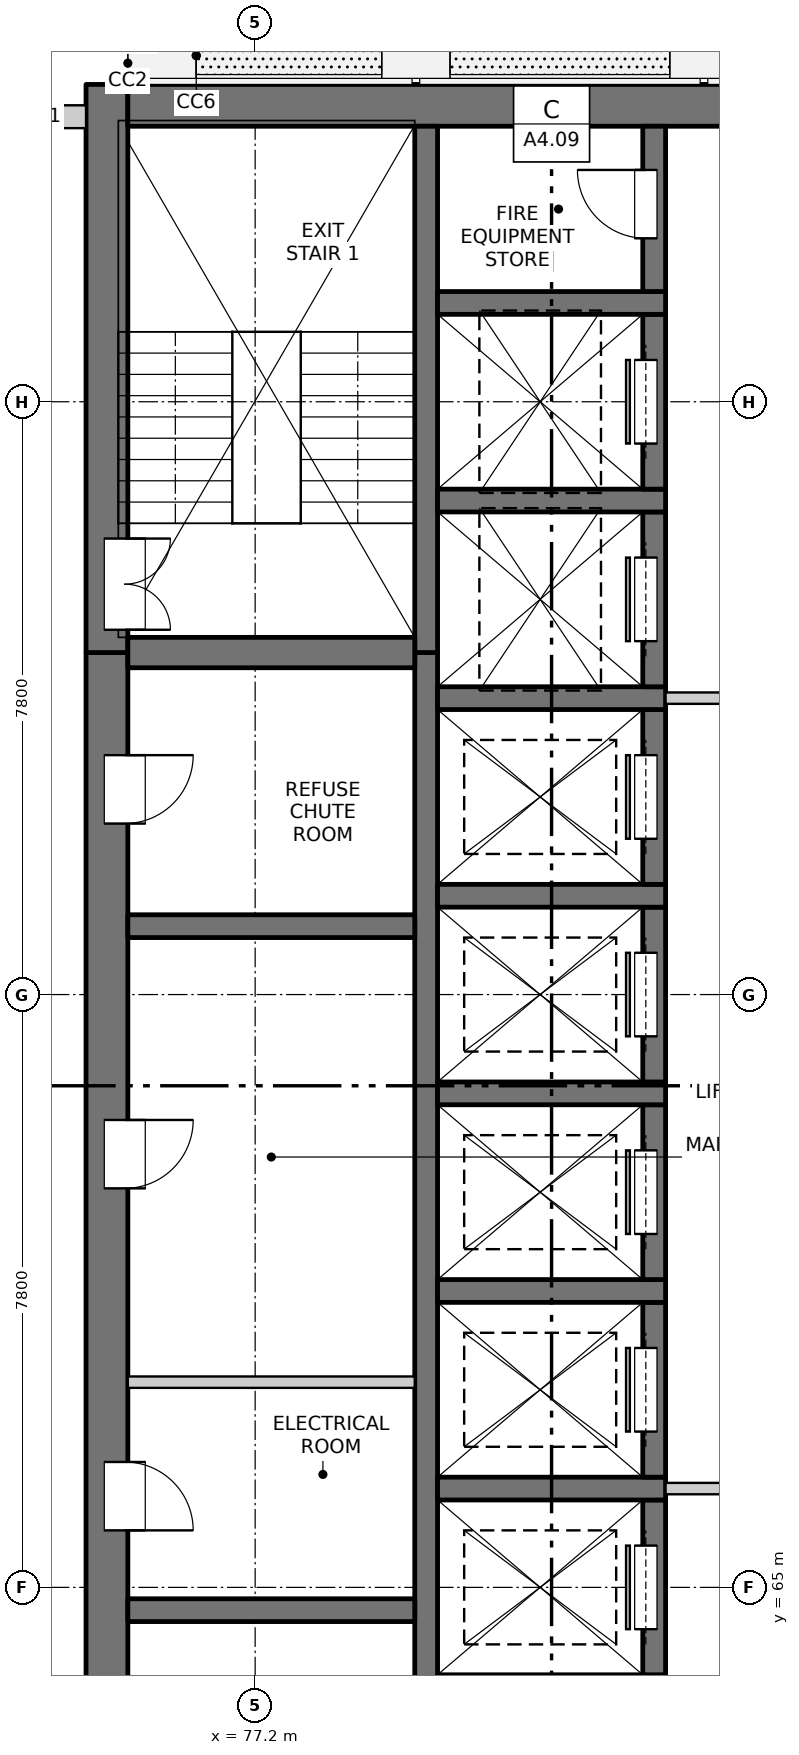
"""IFC4 building model, lengths in metres.
Left out: names, types, materials, properties, quantities, classifications, styles, units other than length and angle.
Written with IfcOpenShell. Run it as: python <this file> out.ifc"""

import sys

from ifc_helpers import new_model, si_unit, direction, frame, frame_2d, origin, place, context, subcontext, project, spatial, rectangle, extrude, element, fill, save


model = new_model("IFC4")
c1 = context("Model", 3, precision=1e-05, world=origin(), true_north=direction((0.0, 1.0)))
c2 = subcontext(c1, "Body", "Model", "MODEL_VIEW")
j1 = project(units=[si_unit("LENGTHUNIT", "METRE"), si_unit("PLANEANGLEUNIT", "RADIAN")], contexts=[c1])
p1 = place(None, origin())
s1 = spatial("IfcSite", under=j1, at=p1, CompositionType="ELEMENT")
p2 = place(p1, origin())
s2 = spatial("IfcBuilding", under=s1, at=p2, CompositionType="ELEMENT")
p3 = place(p2, frame((0.0, 0.0, 110.1)))
s3 = spatial("IfcBuildingStorey", under=s2, at=p3, CompositionType="ELEMENT", Elevation=110.1)
p4 = place(p3, frame((75.25, 54.975, -0.25), z_axis=(0.0, 0.0, 1.0), x_axis=(0.0, 1.0, 0.0)))
e1 = element("IfcWall", 1, at=p4, inside=s3, PredefinedType="SOLIDWALL", context=c2, shape_type="SweptSolid", body=[
    extrude(rectangle(XDim=22.325, YDim=0.55, at=frame_2d((11.163, 0.0))), origin(), (0.0, 0.0, 1.0), 3.4),
])
p5 = place(p4, frame((7.475, 0.0, 0.25)))
e2 = element("IfcOpeningElement", 2, at=p5, cuts=e1, PredefinedType="OPENING", context=c2, shape_type="SweptSolid", body=[
    extrude(rectangle(XDim=0.9, YDim=2.1, at=frame_2d((0.45, 1.05))), frame((0.0, 0.285, 0.0), z_axis=(0.0, -1.0, 0.0), x_axis=(1.0, 0.0, 0.0)), (0.0, 0.0, 1.0), 0.57),
])
p6 = place(p4, frame((10.775, 0.0, 0.25)))
e3 = element("IfcOpeningElement", 3, at=p6, cuts=e1, PredefinedType="OPENING", context=c2, shape_type="SweptSolid", body=[
    extrude(rectangle(XDim=0.9, YDim=2.1, at=frame_2d((0.45, 1.05))), frame((0.0, 0.285, 0.0), z_axis=(0.0, -1.0, 0.0), x_axis=(1.0, 0.0, 0.0)), (0.0, 0.0, 1.0), 0.57),
])
p7 = place(p4, frame((15.275, 0.0, 0.25)))
e4 = element("IfcOpeningElement", 4, at=p7, cuts=e1, PredefinedType="OPENING", context=c2, shape_type="SweptSolid", body=[
    extrude(rectangle(XDim=0.9, YDim=2.1, at=frame_2d((0.45, 1.05))), frame((0.0, 0.285, 0.0), z_axis=(0.0, -1.0, 0.0), x_axis=(1.0, 0.0, 0.0)), (0.0, 0.0, 1.0), 0.57),
])
p8 = place(p4, frame((20.075, 0.0, 0.25)))
e5 = element("IfcOpeningElement", 5, at=p8, cuts=e1, PredefinedType="OPENING", context=c2, shape_type="SweptSolid", body=[
    extrude(rectangle(XDim=0.9, YDim=2.1, at=frame_2d((0.45, 1.05))), frame((0.0, 0.285, 0.0), z_axis=(0.0, -1.0, 0.0), x_axis=(1.0, 0.0, 0.0)), (0.0, 0.0, 1.0), 0.57),
])
p9 = place(p3, frame((75.25, 77.3, -0.25), z_axis=(0.0, 0.0, 1.0), x_axis=(0.0, 1.0, 0.0)))
e6 = element("IfcWall", 6, at=p9, inside=s3, PredefinedType="SOLIDWALL", context=c2, shape_type="SweptSolid", body=[
    extrude(rectangle(XDim=7.475, YDim=0.55, at=frame_2d((3.737, 0.0))), origin(), (0.0, 0.0, 1.0), 3.4),
])
p10 = place(p9, frame((0.3, 0.0, 0.25)))
e7 = element("IfcOpeningElement", 7, at=p10, cuts=e6, PredefinedType="OPENING", context=c2, shape_type="SweptSolid", body=[
    extrude(rectangle(XDim=1.2, YDim=2.1, at=frame_2d((0.6, 1.05))), frame((0.0, 0.285, 0.0), z_axis=(0.0, -1.0, 0.0), x_axis=(1.0, 0.0, 0.0)), (0.0, 0.0, 1.0), 0.57),
])
p11 = place(p3, frame((75.525, 84.5, -0.25), z_axis=(0.0, 0.0, 1.0), x_axis=(1.0, 0.0, 0.0)))
e8 = element("IfcWall", 8, at=p11, inside=s3, PredefinedType="SOLIDWALL", context=c2, shape_type="SweptSolid", body=[
    extrude(rectangle(XDim=18.95, YDim=0.55, at=frame_2d((9.475, 0.0))), origin(), (0.0, 0.0, 1.0), 3.4),
])
p12 = place(p3, frame((79.45, 60.95, -0.25), z_axis=(0.0, 0.0, 1.0), x_axis=(0.0, 1.0, 0.0)))
e9 = element("IfcWall", 9, at=p12, inside=s3, PredefinedType="SOLIDWALL", context=c2, shape_type="SweptSolid", body=[
    extrude(rectangle(XDim=16.35, YDim=0.3, at=frame_2d((8.175, 0.0))), origin(), (0.0, 0.0, 1.0), 3.4),
])
p13 = place(p3, frame((79.45, 77.3, -0.25), z_axis=(0.0, 0.0, 1.0), x_axis=(0.0, 1.0, 0.0)))
e10 = element("IfcWall", 10, at=p13, inside=s3, PredefinedType="SOLIDWALL", context=c2, shape_type="SweptSolid", body=[
    extrude(rectangle(XDim=6.925, YDim=0.3, at=frame_2d((3.462, 0.0))), origin(), (0.0, 0.0, 1.0), 3.4),
])
p14 = place(p3, frame((82.45, 63.85, -0.25), z_axis=(0.0, 0.0, 1.0), x_axis=(0.0, 1.0, 0.0)))
e11 = element("IfcWall", 11, at=p14, inside=s3, PredefinedType="SOLIDWALL", context=c2, shape_type="SweptSolid", body=[
    extrude(rectangle(XDim=2.3, YDim=0.3, at=frame_2d((1.15, 0.0))), origin(), (0.0, 0.0, 1.0), 3.4),
])
p15 = place(p14, frame((0.6, 0.0, 0.25)))
e12 = element("IfcOpeningElement", 12, at=p15, cuts=e11, PredefinedType="OPENING", context=c2, shape_type="SweptSolid", body=[
    extrude(rectangle(XDim=1.1, YDim=2.1, at=frame_2d((0.55, 1.05))), frame((0.0, 0.16, 0.0), z_axis=(0.0, -1.0, 0.0), x_axis=(1.0, 0.0, 0.0)), (0.0, 0.0, 1.0), 0.32),
])
p16 = place(p3, frame((79.6, 66.3, -0.25), z_axis=(0.0, 0.0, 1.0), x_axis=(1.0, 0.0, 0.0)))
e13 = element("IfcWall", 13, at=p16, inside=s3, PredefinedType="SOLIDWALL", context=c2, shape_type="SweptSolid", body=[
    extrude(rectangle(XDim=3.0, YDim=0.3, at=frame_2d((1.5, 0.0))), origin(), (0.0, 0.0, 1.0), 3.4),
])
p17 = place(p3, frame((82.45, 66.45, -0.25), z_axis=(0.0, 0.0, 1.0), x_axis=(0.0, 1.0, 0.0)))
e14 = element("IfcWall", 14, at=p17, inside=s3, PredefinedType="SOLIDWALL", context=c2, shape_type="SweptSolid", body=[
    extrude(rectangle(XDim=2.3, YDim=0.3, at=frame_2d((1.15, 0.0))), origin(), (0.0, 0.0, 1.0), 3.4),
])
p18 = place(p17, frame((0.6, 0.0, 0.25)))
e15 = element("IfcOpeningElement", 15, at=p18, cuts=e14, PredefinedType="OPENING", context=c2, shape_type="SweptSolid", body=[
    extrude(rectangle(XDim=1.1, YDim=2.1, at=frame_2d((0.55, 1.05))), frame((0.0, 0.16, 0.0), z_axis=(0.0, -1.0, 0.0), x_axis=(1.0, 0.0, 0.0)), (0.0, 0.0, 1.0), 0.32),
])
p19 = place(p3, frame((79.6, 68.9, -0.25), z_axis=(0.0, 0.0, 1.0), x_axis=(1.0, 0.0, 0.0)))
e16 = element("IfcWall", 16, at=p19, inside=s3, PredefinedType="SOLIDWALL", context=c2, shape_type="SweptSolid", body=[
    extrude(rectangle(XDim=3.0, YDim=0.3, at=frame_2d((1.5, 0.0))), origin(), (0.0, 0.0, 1.0), 3.4),
])
p20 = place(p3, frame((82.45, 69.05, -0.25), z_axis=(0.0, 0.0, 1.0), x_axis=(0.0, 1.0, 0.0)))
e17 = element("IfcWall", 17, at=p20, inside=s3, PredefinedType="SOLIDWALL", context=c2, shape_type="SweptSolid", body=[
    extrude(rectangle(XDim=2.3, YDim=0.3, at=frame_2d((1.15, 0.0))), origin(), (0.0, 0.0, 1.0), 3.4),
])
p21 = place(p20, frame((0.6, 0.0, 0.25)))
e18 = element("IfcOpeningElement", 18, at=p21, cuts=e17, PredefinedType="OPENING", context=c2, shape_type="SweptSolid", body=[
    extrude(rectangle(XDim=1.1, YDim=2.1, at=frame_2d((0.55, 1.05))), frame((0.0, 0.16, 0.0), z_axis=(0.0, -1.0, 0.0), x_axis=(1.0, 0.0, 0.0)), (0.0, 0.0, 1.0), 0.32),
])
p22 = place(p3, frame((79.6, 71.5, -0.25), z_axis=(0.0, 0.0, 1.0), x_axis=(1.0, 0.0, 0.0)))
e19 = element("IfcWall", 19, at=p22, inside=s3, PredefinedType="SOLIDWALL", context=c2, shape_type="SweptSolid", body=[
    extrude(rectangle(XDim=3.0, YDim=0.3, at=frame_2d((1.5, 0.0))), origin(), (0.0, 0.0, 1.0), 3.4),
])
p23 = place(p3, frame((82.45, 71.65, -0.25), z_axis=(0.0, 0.0, 1.0), x_axis=(0.0, 1.0, 0.0)))
e20 = element("IfcWall", 20, at=p23, inside=s3, PredefinedType="SOLIDWALL", context=c2, shape_type="SweptSolid", body=[
    extrude(rectangle(XDim=2.3, YDim=0.3, at=frame_2d((1.15, 0.0))), origin(), (0.0, 0.0, 1.0), 3.4),
])
p24 = place(p23, frame((0.6, 0.0, 0.25)))
e21 = element("IfcOpeningElement", 21, at=p24, cuts=e20, PredefinedType="OPENING", context=c2, shape_type="SweptSolid", body=[
    extrude(rectangle(XDim=1.1, YDim=2.1, at=frame_2d((0.55, 1.05))), frame((0.0, 0.16, 0.0), z_axis=(0.0, -1.0, 0.0), x_axis=(1.0, 0.0, 0.0)), (0.0, 0.0, 1.0), 0.32),
])
p25 = place(p3, frame((79.6, 74.1, -0.25), z_axis=(0.0, 0.0, 1.0), x_axis=(1.0, 0.0, 0.0)))
e22 = element("IfcWall", 22, at=p25, inside=s3, PredefinedType="SOLIDWALL", context=c2, shape_type="SweptSolid", body=[
    extrude(rectangle(XDim=3.0, YDim=0.3, at=frame_2d((1.5, 0.0))), origin(), (0.0, 0.0, 1.0), 3.4),
])
p26 = place(p3, frame((82.45, 74.25, -0.25), z_axis=(0.0, 0.0, 1.0), x_axis=(0.0, 1.0, 0.0)))
e23 = element("IfcWall", 23, at=p26, inside=s3, PredefinedType="SOLIDWALL", context=c2, shape_type="SweptSolid", body=[
    extrude(rectangle(XDim=2.3, YDim=0.3, at=frame_2d((1.15, 0.0))), origin(), (0.0, 0.0, 1.0), 3.4),
])
p27 = place(p26, frame((0.6, 0.0, 0.25)))
e24 = element("IfcOpeningElement", 24, at=p27, cuts=e23, PredefinedType="OPENING", context=c2, shape_type="SweptSolid", body=[
    extrude(rectangle(XDim=1.1, YDim=2.1, at=frame_2d((0.55, 1.05))), frame((0.0, 0.16, 0.0), z_axis=(0.0, -1.0, 0.0), x_axis=(1.0, 0.0, 0.0)), (0.0, 0.0, 1.0), 0.32),
])
p28 = place(p3, frame((79.6, 76.7, -0.25), z_axis=(0.0, 0.0, 1.0), x_axis=(1.0, 0.0, 0.0)))
e25 = element("IfcWall", 25, at=p28, inside=s3, PredefinedType="SOLIDWALL", context=c2, shape_type="SweptSolid", body=[
    extrude(rectangle(XDim=3.0, YDim=0.3, at=frame_2d((1.5, 0.0))), origin(), (0.0, 0.0, 1.0), 3.4),
])
p29 = place(p3, frame((82.45, 76.85, -0.25), z_axis=(0.0, 0.0, 1.0), x_axis=(0.0, 1.0, 0.0)))
e26 = element("IfcWall", 26, at=p29, inside=s3, PredefinedType="SOLIDWALL", context=c2, shape_type="SweptSolid", body=[
    extrude(rectangle(XDim=2.3, YDim=0.3, at=frame_2d((1.15, 0.0))), origin(), (0.0, 0.0, 1.0), 3.4),
])
p30 = place(p29, frame((0.6, 0.0, 0.25)))
e27 = element("IfcOpeningElement", 27, at=p30, cuts=e26, PredefinedType="OPENING", context=c2, shape_type="SweptSolid", body=[
    extrude(rectangle(XDim=1.1, YDim=2.1, at=frame_2d((0.55, 1.05))), frame((0.0, 0.16, 0.0), z_axis=(0.0, -1.0, 0.0), x_axis=(1.0, 0.0, 0.0)), (0.0, 0.0, 1.0), 0.32),
])
p31 = place(p3, frame((79.6, 79.3, -0.25), z_axis=(0.0, 0.0, 1.0), x_axis=(1.0, 0.0, 0.0)))
e28 = element("IfcWall", 28, at=p31, inside=s3, PredefinedType="SOLIDWALL", context=c2, shape_type="SweptSolid", body=[
    extrude(rectangle(XDim=3.0, YDim=0.3, at=frame_2d((1.5, 0.0))), origin(), (0.0, 0.0, 1.0), 3.4),
])
p32 = place(p3, frame((82.45, 79.45, -0.25), z_axis=(0.0, 0.0, 1.0), x_axis=(0.0, 1.0, 0.0)))
e29 = element("IfcWall", 29, at=p32, inside=s3, PredefinedType="SOLIDWALL", context=c2, shape_type="SweptSolid", body=[
    extrude(rectangle(XDim=2.3, YDim=0.3, at=frame_2d((1.15, 0.0))), origin(), (0.0, 0.0, 1.0), 3.4),
])
p33 = place(p32, frame((0.6, 0.0, 0.25)))
e30 = element("IfcOpeningElement", 30, at=p33, cuts=e29, PredefinedType="OPENING", context=c2, shape_type="SweptSolid", body=[
    extrude(rectangle(XDim=1.1, YDim=2.1, at=frame_2d((0.55, 1.05))), frame((0.0, 0.16, 0.0), z_axis=(0.0, -1.0, 0.0), x_axis=(1.0, 0.0, 0.0)), (0.0, 0.0, 1.0), 0.32),
])
p34 = place(p3, frame((79.6, 81.9, -0.25), z_axis=(0.0, 0.0, 1.0), x_axis=(1.0, 0.0, 0.0)))
e31 = element("IfcWall", 31, at=p34, inside=s3, PredefinedType="SOLIDWALL", context=c2, shape_type="SweptSolid", body=[
    extrude(rectangle(XDim=3.0, YDim=0.3, at=frame_2d((1.5, 0.0))), origin(), (0.0, 0.0, 1.0), 3.4),
])
p35 = place(p3, frame((82.45, 82.05, -0.25), z_axis=(0.0, 0.0, 1.0), x_axis=(0.0, 1.0, 0.0)))
e32 = element("IfcWall", 32, at=p35, inside=s3, PredefinedType="SOLIDWALL", context=c2, shape_type="SweptSolid", body=[
    extrude(rectangle(XDim=2.175, YDim=0.3, at=frame_2d((1.087, 0.0))), origin(), (0.0, 0.0, 1.0), 3.4),
])
p36 = place(p35, frame((0.7, 0.0, 0.25)))
e33 = element("IfcOpeningElement", 33, at=p36, cuts=e32, PredefinedType="OPENING", context=c2, shape_type="SweptSolid", body=[
    extrude(rectangle(XDim=0.9, YDim=2.1, at=frame_2d((0.45, 1.05))), frame((0.0, 0.16, 0.0), z_axis=(0.0, -1.0, 0.0), x_axis=(1.0, 0.0, 0.0)), (0.0, 0.0, 1.0), 0.32),
])
for number, where, z_axis, x_axis in (
    (34, (75.525, 64.7, -0.25), (0.0, 0.0, 1.0), (1.0, 0.0, 0.0)),
    (35, (75.525, 73.7, -0.25), (0.0, 0.0, 1.0), (1.0, 0.0, 0.0)),
):
    element("IfcWall", number, at=place(p3, frame(where, z_axis=z_axis, x_axis=x_axis)), inside=s3, PredefinedType="SOLIDWALL", context=c2, shape_type="SweptSolid", body=[
        extrude(rectangle(XDim=3.775, YDim=0.3, at=frame_2d((1.888, 0.0))), origin(), (0.0, 0.0, 1.0), 3.4),
    ])
p37 = place(p3, frame((75.525, 77.3, -0.25), z_axis=(0.0, 0.0, 1.0), x_axis=(1.0, 0.0, 0.0)))
e36 = element("IfcWall", 36, at=p37, inside=s3, PredefinedType="SOLIDWALL", context=c2, shape_type="SweptSolid", body=[
    extrude(rectangle(XDim=3.775, YDim=0.4, at=frame_2d((1.888, 0.0))), origin(), (0.0, 0.0, 1.0), 3.4),
])
p38 = place(p3, frame((73.725, 84.35, 0.0), z_axis=(0.0, 0.0, 1.0), x_axis=(1.0, 0.0, 0.0)))
e37 = element("IfcWall", 37, at=p38, inside=s3, PredefinedType="SOLIDWALL", context=c2, shape_type="SweptSolid", body=[
    extrude(rectangle(XDim=1.25, YDim=0.3, at=frame_2d((0.625, 0.0))), origin(), (0.0, 0.0, 1.0), 2.7),
])
p39 = place(p3, frame((82.6, 66.3, 0.0), z_axis=(0.0, 0.0, 1.0), x_axis=(1.0, 0.0, 0.0)))
e38 = element("IfcWall", 38, at=p39, inside=s3, PredefinedType="PARTITIONING", context=c2, shape_type="SweptSolid", body=[
    extrude(rectangle(XDim=4.8, YDim=0.15, at=frame_2d((2.4, 0.0))), origin(), (0.0, 0.0, 1.0), 3.15),
])
p40 = place(p39, frame((1.5, 0.0, 0.0)))
e39 = element("IfcOpeningElement", 39, at=p40, cuts=e38, PredefinedType="OPENING", context=c2, shape_type="SweptSolid", body=[
    extrude(rectangle(XDim=1.8, YDim=2.1, at=frame_2d((0.9, 1.05))), frame((0.0, 0.085, 0.0), z_axis=(0.0, -1.0, 0.0), x_axis=(1.0, 0.0, 0.0)), (0.0, 0.0, 1.0), 0.17),
])
p41 = place(p3, frame((75.525, 67.7, 0.0), z_axis=(0.0, 0.0, 1.0), x_axis=(1.0, 0.0, 0.0)))
e40 = element("IfcWall", 40, at=p41, inside=s3, PredefinedType="PARTITIONING", context=c2, shape_type="SweptSolid", body=[
    extrude(rectangle(XDim=3.775, YDim=0.15, at=frame_2d((1.887, 0.0))), origin(), (0.0, 0.0, 1.0), 3.15),
])
p42 = place(p3, frame((82.6, 76.7, 0.0), z_axis=(0.0, 0.0, 1.0), x_axis=(1.0, 0.0, 0.0)))
e41 = element("IfcWall", 41, at=p42, inside=s3, PredefinedType="PARTITIONING", context=c2, shape_type="SweptSolid", body=[
    extrude(rectangle(XDim=4.8, YDim=0.15, at=frame_2d((2.4, 0.0))), origin(), (0.0, 0.0, 1.0), 3.15),
])
p43 = place(p42, frame((1.5, 0.0, 0.0)))
e42 = element("IfcOpeningElement", 42, at=p43, cuts=e41, PredefinedType="OPENING", context=c2, shape_type="SweptSolid", body=[
    extrude(rectangle(XDim=1.8, YDim=2.1, at=frame_2d((0.9, 1.05))), frame((0.0, 0.085, 0.0), z_axis=(0.0, -1.0, 0.0), x_axis=(1.0, 0.0, 0.0)), (0.0, 0.0, 1.0), 0.17),
])
p44 = place(p15, origin())
e43 = element("IfcDoor", 43, at=p44, inside=s3, OperationType="SLIDING_TO_RIGHT", PredefinedType="DOOR", context=c2, shape_type="SweptSolid", body=[
    extrude(rectangle(XDim=1.1, YDim=2.1, at=frame_2d((0.55, 1.05))), frame((0.0, 0.135, 0.0), z_axis=(0.0, -1.0, 0.0), x_axis=(1.0, 0.0, 0.0)), (0.0, 0.0, 1.0), 0.05),
])
fill(e12, e43)
p45 = place(p6, origin())
e44 = element("IfcDoor", 44, at=p45, inside=s3, OperationType="SINGLE_SWING_RIGHT", PredefinedType="DOOR", context=c2, shape_type="SweptSolid", body=[
    extrude(rectangle(XDim=0.9, YDim=2.1, at=frame_2d((0.45, 1.05))), frame((0.0, -0.21, 0.0), z_axis=(0.0, -1.0, 0.0), x_axis=(1.0, 0.0, 0.0)), (0.0, 0.0, 1.0), 0.05),
])
fill(e3, e44)
p46 = place(p18, origin())
e45 = element("IfcDoor", 45, at=p46, inside=s3, OperationType="SLIDING_TO_RIGHT", PredefinedType="DOOR", context=c2, shape_type="SweptSolid", body=[
    extrude(rectangle(XDim=1.1, YDim=2.1, at=frame_2d((0.55, 1.05))), frame((0.0, 0.135, 0.0), z_axis=(0.0, -1.0, 0.0), x_axis=(1.0, 0.0, 0.0)), (0.0, 0.0, 1.0), 0.05),
])
fill(e15, e45)
p47 = place(p21, origin())
e46 = element("IfcDoor", 46, at=p47, inside=s3, OperationType="SLIDING_TO_LEFT", PredefinedType="DOOR", context=c2, shape_type="SweptSolid", body=[
    extrude(rectangle(XDim=1.1, YDim=2.1, at=frame_2d((0.55, 1.05))), frame((0.0, 0.135, 0.0), z_axis=(0.0, -1.0, 0.0), x_axis=(1.0, 0.0, 0.0)), (0.0, 0.0, 1.0), 0.05),
])
fill(e18, e46)
p48 = place(p7, origin())
e47 = element("IfcDoor", 47, at=p48, inside=s3, OperationType="SINGLE_SWING_LEFT", PredefinedType="DOOR", context=c2, shape_type="SweptSolid", body=[
    extrude(rectangle(XDim=0.9, YDim=2.1, at=frame_2d((0.45, 1.05))), frame((0.0, -0.21, 0.0), z_axis=(0.0, -1.0, 0.0), x_axis=(1.0, 0.0, 0.0)), (0.0, 0.0, 1.0), 0.05),
])
fill(e4, e47)
p49 = place(p24, origin())
e48 = element("IfcDoor", 48, at=p49, inside=s3, OperationType="SLIDING_TO_LEFT", PredefinedType="DOOR", context=c2, shape_type="SweptSolid", body=[
    extrude(rectangle(XDim=1.1, YDim=2.1, at=frame_2d((0.55, 1.05))), frame((0.0, 0.135, 0.0), z_axis=(0.0, -1.0, 0.0), x_axis=(1.0, 0.0, 0.0)), (0.0, 0.0, 1.0), 0.05),
])
fill(e21, e48)
p50 = place(p27, origin())
e49 = element("IfcDoor", 49, at=p50, inside=s3, OperationType="SLIDING_TO_LEFT", PredefinedType="DOOR", context=c2, shape_type="SweptSolid", body=[
    extrude(rectangle(XDim=1.1, YDim=2.1, at=frame_2d((0.55, 1.05))), frame((0.0, 0.135, 0.0), z_axis=(0.0, -1.0, 0.0), x_axis=(1.0, 0.0, 0.0)), (0.0, 0.0, 1.0), 0.05),
])
fill(e24, e49)
p51 = place(p8, origin())
e50 = element("IfcDoor", 50, at=p51, inside=s3, OperationType="SINGLE_SWING_LEFT", PredefinedType="DOOR", context=c2, shape_type="SweptSolid", body=[
    extrude(rectangle(XDim=0.9, YDim=2.1, at=frame_2d((0.45, 1.05))), frame((0.0, -0.21, 0.0), z_axis=(0.0, -1.0, 0.0), x_axis=(1.0, 0.0, 0.0)), (0.0, 0.0, 1.0), 0.05),
])
fill(e5, e50)
p52 = place(p30, origin())
e51 = element("IfcDoor", 51, at=p52, inside=s3, OperationType="SLIDING_TO_LEFT", PredefinedType="DOOR", context=c2, shape_type="SweptSolid", body=[
    extrude(rectangle(XDim=1.1, YDim=2.1, at=frame_2d((0.55, 1.05))), frame((0.0, 0.135, 0.0), z_axis=(0.0, -1.0, 0.0), x_axis=(1.0, 0.0, 0.0)), (0.0, 0.0, 1.0), 0.05),
])
fill(e27, e51)
p53 = place(p10, origin())
e52 = element("IfcDoor", 52, at=p53, inside=s3, OperationType="DOUBLE_DOOR_SINGLE_SWING", PredefinedType="DOOR", context=c2, shape_type="SweptSolid", body=[
    extrude(rectangle(XDim=1.2, YDim=2.1, at=frame_2d((0.6, 1.05))), frame((0.0, -0.21, 0.0), z_axis=(0.0, -1.0, 0.0), x_axis=(1.0, 0.0, 0.0)), (0.0, 0.0, 1.0), 0.05),
])
fill(e7, e52)
p54 = place(p33, origin())
e53 = element("IfcDoor", 53, at=p54, inside=s3, OperationType="SLIDING_TO_LEFT", PredefinedType="DOOR", context=c2, shape_type="SweptSolid", body=[
    extrude(rectangle(XDim=1.1, YDim=2.1, at=frame_2d((0.55, 1.05))), frame((0.0, 0.135, 0.0), z_axis=(0.0, -1.0, 0.0), x_axis=(1.0, 0.0, 0.0)), (0.0, 0.0, 1.0), 0.05),
])
fill(e30, e53)
p55 = place(p36, origin())
e54 = element("IfcDoor", 54, at=p55, inside=s3, OperationType="SINGLE_SWING_RIGHT", PredefinedType="DOOR", context=c2, shape_type="SweptSolid", body=[
    extrude(rectangle(XDim=0.9, YDim=2.1, at=frame_2d((0.45, 1.05))), frame((0.0, 0.135, 0.0), z_axis=(0.0, -1.0, 0.0), x_axis=(1.0, 0.0, 0.0)), (0.0, 0.0, 1.0), 0.05),
])
fill(e33, e54)
save(model, sys.argv[1])
